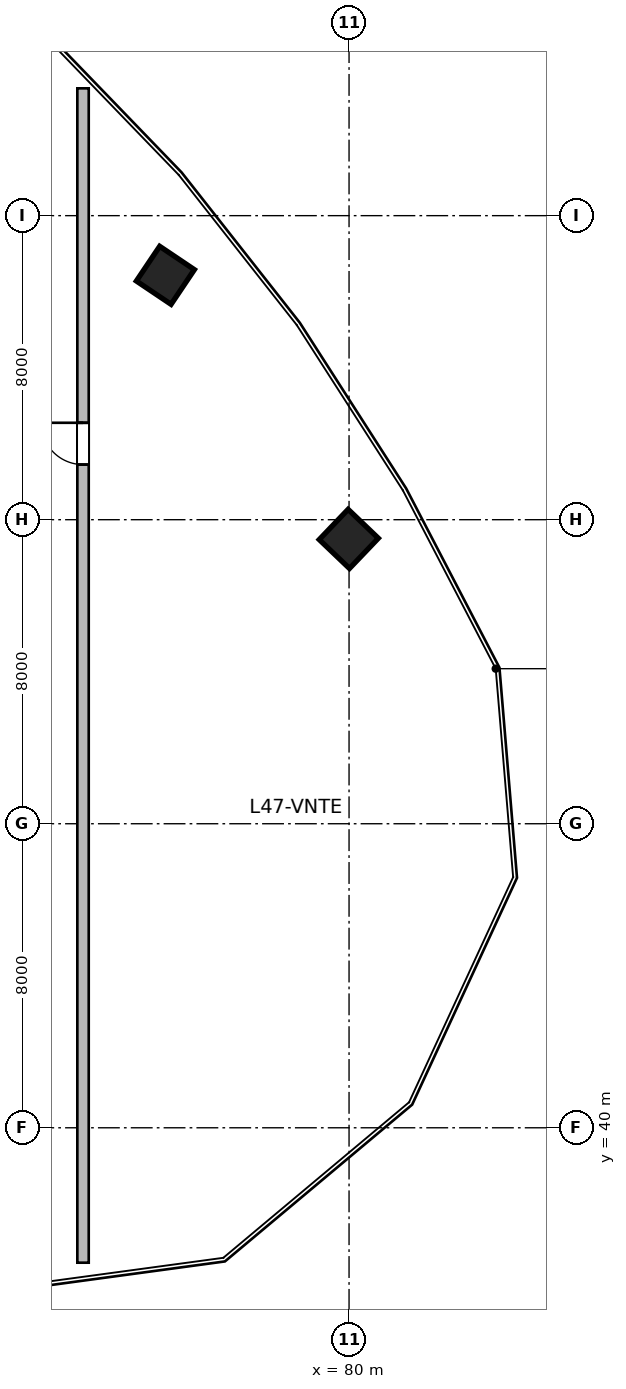
"""IFC4 building model, lengths in metres.
Left out: names, types, materials, properties, quantities, classifications, styles, units other than length and angle.
Written with IfcOpenShell. Run it as: python <this file> out.ifc"""

import sys

from ifc_helpers import new_model, si_unit, direction, frame, frame_2d, origin, origin_2d, place, context, subcontext, project, spatial, rectangle, extrude, source, transform, mapped, element, fill, save


model = new_model("IFC4")
c1 = context("Model", 3, precision=1e-05, world=origin(), true_north=direction((0.0, 1.0)))
c2 = subcontext(c1, "Body", "Model", "MODEL_VIEW")
j1 = project(units=[si_unit("LENGTHUNIT", "METRE"), si_unit("PLANEANGLEUNIT", "RADIAN")], contexts=[c1])
p1 = place(None, origin())
s1 = spatial("IfcSite", under=j1, at=p1, CompositionType="ELEMENT")
p2 = place(p1, origin())
s2 = spatial("IfcBuilding", under=s1, at=p2, CompositionType="ELEMENT")
p3 = place(p2, frame((0.0, 0.0, 194.4)))
s3 = spatial("IfcBuildingStorey", under=s2, at=p3, CompositionType="ELEMENT", Elevation=194.4)
m1 = source(origin(), c2, "Body", "SweptSolid", [
    extrude(rectangle(XDim=1.1, YDim=1.1, at=origin_2d()), origin(), (0.0, 0.0, 1.0), 4.8),
])
for number, where, z_axis, x_axis in (
    (1, (75.167, 62.43, 0.0), (0.0, 0.0, 1.0), (0.558, 0.83, 0.0)),
    (2, (79.993, 55.494, 0.0), (0.0, 0.0, 1.0), (0.691, 0.723, 0.0)),
):
    element("IfcColumn", number, at=place(p3, frame(where, z_axis=z_axis, x_axis=x_axis)), inside=s3, PredefinedType="COLUMN", context=c2, shape_type="MappedRepresentation", body=[
        mapped(m1, transform((0.0, 0.0, 0.0), scale=1.0)),
    ])
m2 = source(origin(), c2, "Body", "SweptSolid", [
    extrude(rectangle(XDim=30.9, YDim=0.3, at=frame_2d((15.45, 0.0))), origin(), (0.0, 0.0, 1.0), 4.54),
])
p4 = place(p3, frame((73.0, 36.45, 0.0), z_axis=(0.0, 0.0, 1.0), x_axis=(0.0, 1.0, 0.0)))
e3 = element("IfcWall", 3, at=p4, inside=s3, PredefinedType="SOLIDWALL", context=c2, shape_type="MappedRepresentation", body=[
    mapped(m2, transform((0.0, 0.0, 0.0), scale=1.0)),
])
p5 = place(p4, frame((21.0, 0.0, 0.0)))
e4 = element("IfcOpeningElement", 4, at=p5, cuts=e3, PredefinedType="OPENING", context=c2, shape_type="SweptSolid", body=[
    extrude(rectangle(XDim=1.1, YDim=2.15, at=frame_2d((0.55, 1.075))), frame((0.0, 0.16, 0.0), z_axis=(0.0, -1.0, 0.0), x_axis=(1.0, 0.0, 0.0)), (0.0, 0.0, 1.0), 0.32),
])
m3 = source(origin(), c2, "Body", "SweptSolid", [
    extrude(rectangle(XDim=1.1, YDim=2.15, at=frame_2d((0.55, 1.075))), frame((0.0, 0.025, 0.0), z_axis=(0.0, -1.0, 0.0), x_axis=(1.0, 0.0, 0.0)), (0.0, 0.0, 1.0), 0.05),
])
p6 = place(p5, origin())
e5 = element("IfcDoor", 5, at=p6, inside=s3, OperationType="SINGLE_SWING_RIGHT", PredefinedType="DOOR", context=c2, shape_type="MappedRepresentation", body=[
    mapped(m3, transform((0.0, 0.0, 0.0), scale=1.0)),
])
fill(e4, e5)
save(model, sys.argv[1])
